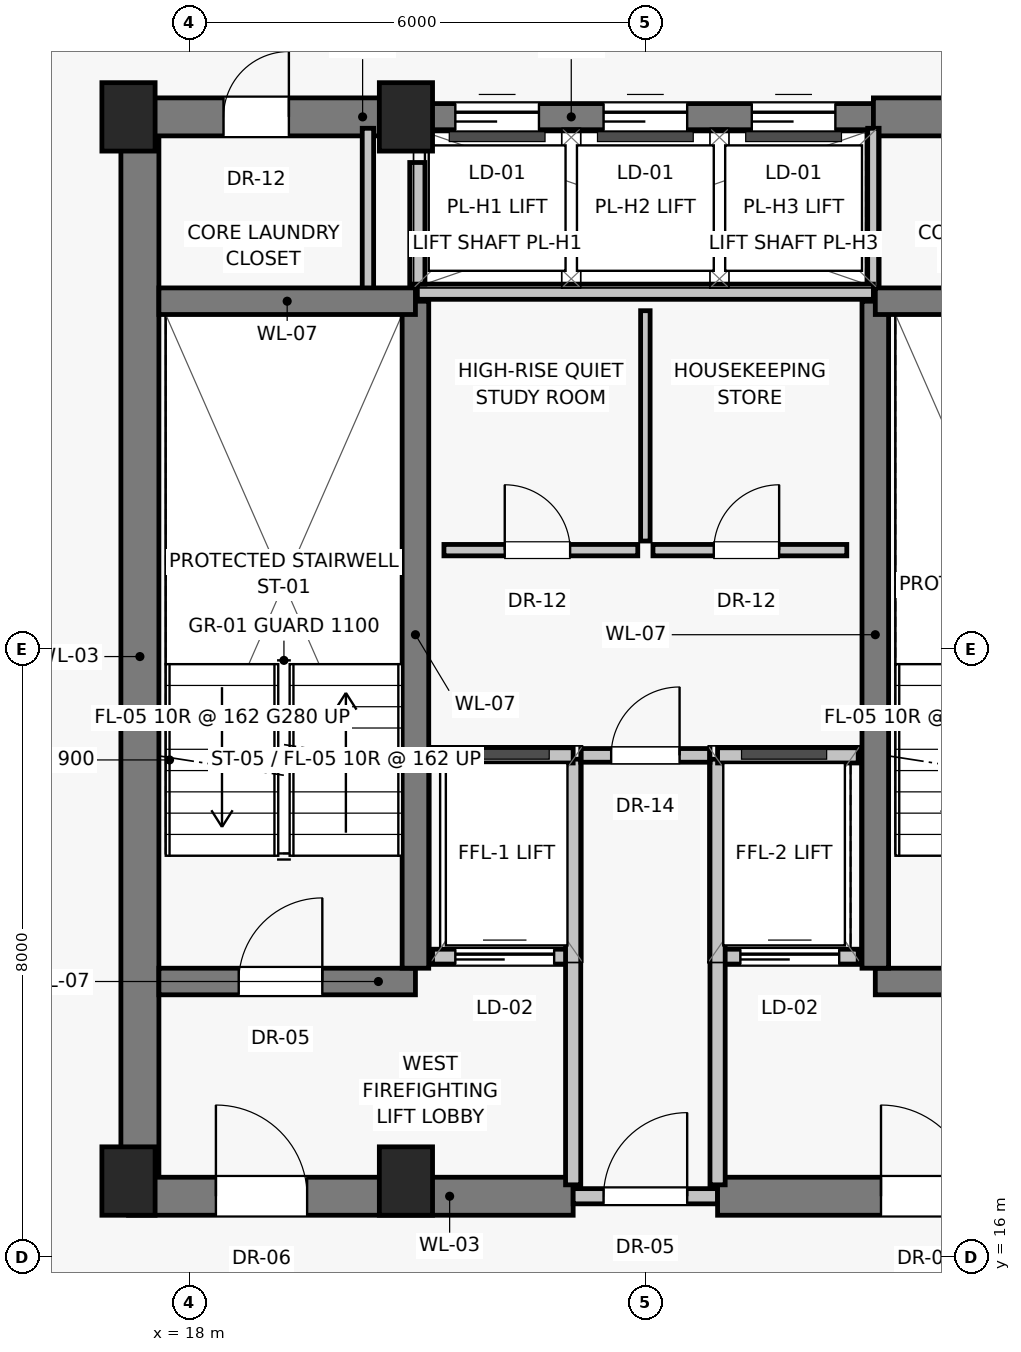
"""IFC4 building model, lengths in metres.
Left out: names, types, materials, properties, quantities, classifications, styles, units other than length and angle.
Written with IfcOpenShell. Run it as: python <this file> out.ifc"""

import sys

from ifc_helpers import new_model, si_unit, direction, frame, frame_2d, origin, origin_2d, place, context, subcontext, project, spatial, rectangle, extrude, source, transform, mapped, element, fill, save


model = new_model("IFC4")
c1 = context("Model", 3, precision=1e-05, world=origin(), true_north=direction((0.0, 1.0)))
c2 = subcontext(c1, "Body", "Model", "MODEL_VIEW")
j1 = project(units=[si_unit("LENGTHUNIT", "METRE"), si_unit("PLANEANGLEUNIT", "RADIAN")], contexts=[c1])
p1 = place(None, origin())
s1 = spatial("IfcSite", under=j1, at=p1, CompositionType="ELEMENT")
p2 = place(p1, origin())
s2 = spatial("IfcBuilding", under=s1, at=p2, CompositionType="ELEMENT")
p3 = place(p2, frame((0.0, 0.0, 188.6)))
s3 = spatial("IfcBuildingStorey", under=s2, at=p3, CompositionType="ELEMENT", Elevation=188.6)
for number, where, z_axis, x_axis in (
    (1, (17.2, 17.0, 0.0), (0.0, 0.0, 1.0), (1.0, 0.0, 0.0)),
    (2, (20.85, 17.0, 0.0), (0.0, 0.0, 1.0), (1.0, 0.0, 0.0)),
    (3, (17.2, 31.0, 0.0), (0.0, 0.0, 1.0), (1.0, 0.0, 0.0)),
    (4, (20.85, 31.0, 0.0), (0.0, 0.0, 1.0), (1.0, 0.0, 0.0)),
):
    element("IfcColumn", number, at=place(p3, frame(where, z_axis=z_axis, x_axis=x_axis)), inside=s3, PredefinedType="PILASTER", context=c2, shape_type="SweptSolid", body=[
        extrude(rectangle(XDim=0.7, YDim=0.9, at=origin_2d()), origin(), (0.0, 0.0, 1.0), 3.25),
    ])
p4 = place(p3, frame((17.35, 16.8, 0.0), z_axis=(0.0, 0.0, 1.0), x_axis=(0.0, 1.0, 0.0)))
e5 = element("IfcWall", 5, at=p4, inside=s3, PredefinedType="SHEAR", context=c2, shape_type="SweptSolid", body=[
    extrude(rectangle(XDim=14.2, YDim=0.5, at=frame_2d((7.1, 0.0))), origin(), (0.0, 0.0, 1.0), 3.015),
])
p5 = place(p3, frame((17.2, 16.8, 0.0), z_axis=(0.0, 0.0, 1.0), x_axis=(1.0, 0.0, 0.0)))
e6 = element("IfcWall", 6, at=p5, inside=s3, PredefinedType="SHEAR", context=c2, shape_type="SweptSolid", body=[
    extrude(rectangle(XDim=5.85, YDim=0.5, at=frame_2d((2.925, 0.0))), origin(), (0.0, 0.0, 1.0), 3.015),
])
p6 = place(p5, frame((1.15, 0.0, 0.0)))
e7 = element("IfcOpeningElement", 7, at=p6, cuts=e6, PredefinedType="OPENING", context=c2, shape_type="SweptSolid", body=[
    extrude(rectangle(XDim=1.2, YDim=2.03, at=frame_2d((0.6, 1.015))), frame((0.0, 0.26, 0.0), z_axis=(0.0, -1.0, 0.0), x_axis=(1.0, 0.0, 0.0)), (0.0, 0.0, 1.0), 0.52),
])
p7 = place(p3, frame((23.05, 16.8, 0.0), z_axis=(0.0, 0.0, 1.0), x_axis=(1.0, 0.0, 0.0)))
e8 = element("IfcWall", 8, at=p7, inside=s3, PredefinedType="SOLIDWALL", context=c2, shape_type="SweptSolid", body=[
    extrude(rectangle(XDim=1.9, YDim=0.2, at=frame_2d((0.95, 0.0))), origin(), (0.0, 0.0, 1.0), 2.165),
])
p8 = place(p7, frame((0.4, 0.0, 0.0)))
e9 = element("IfcOpeningElement", 9, at=p8, cuts=e8, PredefinedType="OPENING", context=c2, shape_type="SweptSolid", body=[
    extrude(rectangle(XDim=1.1, YDim=2.03, at=frame_2d((0.55, 1.015))), frame((0.0, 0.11, 0.0), z_axis=(0.0, -1.0, 0.0), x_axis=(1.0, 0.0, 0.0)), (0.0, 0.0, 1.0), 0.22),
])
p9 = place(p3, frame((24.95, 16.8, 0.0), z_axis=(0.0, 0.0, 1.0), x_axis=(1.0, 0.0, 0.0)))
e10 = element("IfcWall", 10, at=p9, inside=s3, PredefinedType="SHEAR", context=c2, shape_type="SweptSolid", body=[
    extrude(rectangle(XDim=5.85, YDim=0.5, at=frame_2d((2.925, 0.0))), origin(), (0.0, 0.0, 1.0), 3.015),
])
p10 = place(p9, frame((2.15, 0.0, 0.0)))
e11 = element("IfcOpeningElement", 11, at=p10, cuts=e10, PredefinedType="OPENING", context=c2, shape_type="SweptSolid", body=[
    extrude(rectangle(XDim=1.2, YDim=2.03, at=frame_2d((0.6, 1.015))), frame((0.0, 0.26, 0.0), z_axis=(0.0, -1.0, 0.0), x_axis=(1.0, 0.0, 0.0)), (0.0, 0.0, 1.0), 0.52),
])
p11 = place(p3, frame((17.2, 31.0, 0.0), z_axis=(0.0, 0.0, 1.0), x_axis=(1.0, 0.0, 0.0)))
e12 = element("IfcWall", 12, at=p11, inside=s3, PredefinedType="SHEAR", context=c2, shape_type="SweptSolid", body=[
    extrude(rectangle(XDim=3.8, YDim=0.5, at=frame_2d((1.9, 0.0))), origin(), (0.0, 0.0, 1.0), 3.015),
])
p12 = place(p11, frame((1.25, 0.0, 0.0)))
e13 = element("IfcOpeningElement", 13, at=p12, cuts=e12, PredefinedType="OPENING", context=c2, shape_type="SweptSolid", body=[
    extrude(rectangle(XDim=0.86, YDim=2.01, at=frame_2d((0.43, 1.005))), frame((0.0, 0.26, 0.0), z_axis=(0.0, -1.0, 0.0), x_axis=(1.0, 0.0, 0.0)), (0.0, 0.0, 1.0), 0.52),
])
p13 = place(p3, frame((21.0, 31.0, 0.0), z_axis=(0.0, 0.0, 1.0), x_axis=(1.0, 0.0, 0.0)))
e14 = element("IfcWall", 14, at=p13, inside=s3, PredefinedType="SHEAR", context=c2, shape_type="SweptSolid", body=[
    extrude(rectangle(XDim=6.0, YDim=0.35, at=frame_2d((3.0, 0.0))), origin(), (0.0, 0.0, 1.0), 3.015),
])
p14 = place(p13, frame((0.5, 0.0, 0.0)))
e15 = element("IfcOpeningElement", 15, at=p14, cuts=e14, PredefinedType="OPENING", context=c2, shape_type="SweptSolid", body=[
    extrude(rectangle(XDim=1.1, YDim=2.08, at=frame_2d((0.55, 1.04))), frame((0.0, 0.185, 0.0), z_axis=(0.0, -1.0, 0.0), x_axis=(1.0, 0.0, 0.0)), (0.0, 0.0, 1.0), 0.37),
])
p15 = place(p13, frame((2.45, 0.0, 0.0)))
e16 = element("IfcOpeningElement", 16, at=p15, cuts=e14, PredefinedType="OPENING", context=c2, shape_type="SweptSolid", body=[
    extrude(rectangle(XDim=1.1, YDim=2.08, at=frame_2d((0.55, 1.04))), frame((0.0, 0.185, 0.0), z_axis=(0.0, -1.0, 0.0), x_axis=(1.0, 0.0, 0.0)), (0.0, 0.0, 1.0), 0.37),
])
p16 = place(p13, frame((4.4, 0.0, 0.0)))
e17 = element("IfcOpeningElement", 17, at=p16, cuts=e14, PredefinedType="OPENING", context=c2, shape_type="SweptSolid", body=[
    extrude(rectangle(XDim=1.1, YDim=2.08, at=frame_2d((0.55, 1.04))), frame((0.0, 0.185, 0.0), z_axis=(0.0, -1.0, 0.0), x_axis=(1.0, 0.0, 0.0)), (0.0, 0.0, 1.0), 0.37),
])
p17 = place(p3, frame((27.0, 31.0, 0.0), z_axis=(0.0, 0.0, 1.0), x_axis=(1.0, 0.0, 0.0)))
e18 = element("IfcWall", 18, at=p17, inside=s3, PredefinedType="SHEAR", context=c2, shape_type="SweptSolid", body=[
    extrude(rectangle(XDim=3.8, YDim=0.5, at=frame_2d((1.9, 0.0))), origin(), (0.0, 0.0, 1.0), 3.015),
])
p18 = place(p17, frame((1.15, 0.0, 0.0)))
e19 = element("IfcOpeningElement", 19, at=p18, cuts=e18, PredefinedType="OPENING", context=c2, shape_type="SweptSolid", body=[
    extrude(rectangle(XDim=1.0, YDim=2.01, at=frame_2d((0.5, 1.005))), frame((0.0, 0.26, 0.0), z_axis=(0.0, -1.0, 0.0), x_axis=(1.0, 0.0, 0.0)), (0.0, 0.0, 1.0), 0.52),
])
for number, where, z_axis, x_axis in (
    (20, (20.35, 28.65, 0.0), (0.0, 0.0, 1.0), (0.0, 1.0, 0.0)),
    (21, (27.0, 28.65, 0.0), (0.0, 0.0, 1.0), (0.0, 1.0, 0.0)),
):
    element("IfcWall", number, at=place(p3, frame(where, z_axis=z_axis, x_axis=x_axis)), inside=s3, PredefinedType="PARTITIONING", context=c2, shape_type="SweptSolid", body=[
        extrude(rectangle(XDim=2.2, YDim=0.15, at=frame_2d((1.1, 0.0))), origin(), (0.0, 0.0, 1.0), 3.015),
    ])
p19 = place(p3, frame((17.6, 19.625, 0.0), z_axis=(0.0, 0.0, 1.0), x_axis=(1.0, 0.0, 0.0)))
e22 = element("IfcWall", 22, at=p19, inside=s3, PredefinedType="SHEAR", context=c2, shape_type="SweptSolid", body=[
    extrude(rectangle(XDim=3.375, YDim=0.35, at=frame_2d((1.688, 0.0))), origin(), (0.0, 0.0, 1.0), 3.015),
])
p20 = place(p19, frame((1.05, 0.0, 0.0)))
e23 = element("IfcOpeningElement", 23, at=p20, cuts=e22, PredefinedType="OPENING", context=c2, shape_type="SweptSolid", body=[
    extrude(rectangle(XDim=1.1, YDim=2.03, at=frame_2d((0.55, 1.015))), frame((0.0, 0.185, 0.0), z_axis=(0.0, -1.0, 0.0), x_axis=(1.0, 0.0, 0.0)), (0.0, 0.0, 1.0), 0.37),
])
p21 = place(p3, frame((21.2, 19.95, 0.0), z_axis=(0.0, 0.0, 1.0), x_axis=(1.0, 0.0, 0.0)))
e24 = element("IfcWall", 24, at=p21, inside=s3, PredefinedType="SOLIDWALL", context=c2, shape_type="SweptSolid", body=[
    extrude(rectangle(XDim=1.85, YDim=0.2, at=frame_2d((0.925, 0.0))), origin(), (0.0, 0.0, 1.0), 3.015),
])
p22 = place(p21, frame((0.3, 0.0, 0.0)))
e25 = element("IfcOpeningElement", 25, at=p22, cuts=e24, PredefinedType="OPENING", context=c2, shape_type="SweptSolid", body=[
    extrude(rectangle(XDim=1.3, YDim=2.25, at=frame_2d((0.65, 1.125))), frame((0.0, 0.11, 0.0), z_axis=(0.0, -1.0, 0.0), x_axis=(1.0, 0.0, 0.0)), (0.0, 0.0, 1.0), 0.22),
])
p23 = place(p3, frame((24.95, 19.95, 0.0), z_axis=(0.0, 0.0, 1.0), x_axis=(1.0, 0.0, 0.0)))
e26 = element("IfcWall", 26, at=p23, inside=s3, PredefinedType="SOLIDWALL", context=c2, shape_type="SweptSolid", body=[
    extrude(rectangle(XDim=1.85, YDim=0.2, at=frame_2d((0.925, 0.0))), origin(), (0.0, 0.0, 1.0), 3.015),
])
p24 = place(p23, frame((0.3, 0.0, 0.0)))
e27 = element("IfcOpeningElement", 27, at=p24, cuts=e26, PredefinedType="OPENING", context=c2, shape_type="SweptSolid", body=[
    extrude(rectangle(XDim=1.3, YDim=2.25, at=frame_2d((0.65, 1.125))), frame((0.0, 0.11, 0.0), z_axis=(0.0, -1.0, 0.0), x_axis=(1.0, 0.0, 0.0)), (0.0, 0.0, 1.0), 0.22),
])
p25 = place(p3, frame((27.025, 19.625, 0.0), z_axis=(0.0, 0.0, 1.0), x_axis=(1.0, 0.0, 0.0)))
e28 = element("IfcWall", 28, at=p25, inside=s3, PredefinedType="SHEAR", context=c2, shape_type="SweptSolid", body=[
    extrude(rectangle(XDim=3.375, YDim=0.35, at=frame_2d((1.688, 0.0))), origin(), (0.0, 0.0, 1.0), 3.015),
])
p26 = place(p25, frame((1.05, 0.0, 0.0)))
e29 = element("IfcOpeningElement", 29, at=p26, cuts=e28, PredefinedType="OPENING", context=c2, shape_type="SweptSolid", body=[
    extrude(rectangle(XDim=1.1, YDim=2.03, at=frame_2d((0.55, 1.015))), frame((0.0, 0.185, 0.0), z_axis=(0.0, -1.0, 0.0), x_axis=(1.0, 0.0, 0.0)), (0.0, 0.0, 1.0), 0.37),
])
for number, where, z_axis, x_axis in (
    (30, (20.975, 19.8, 0.0), (0.0, 0.0, 1.0), (0.0, 1.0, 0.0)),
    (31, (27.025, 19.8, 0.0), (0.0, 0.0, 1.0), (0.0, 1.0, 0.0)),
):
    element("IfcWall", number, at=place(p3, frame(where, z_axis=z_axis, x_axis=x_axis)), inside=s3, PredefinedType="SHEAR", context=c2, shape_type="SweptSolid", body=[
        extrude(rectangle(XDim=8.775, YDim=0.35, at=frame_2d((4.387, 0.0))), origin(), (0.0, 0.0, 1.0), 3.015),
    ])
for number, where, z_axis, x_axis in (
    (32, (17.6, 28.575, 0.0), (0.0, 0.0, 1.0), (1.0, 0.0, 0.0)),
    (33, (27.025, 28.575, 0.0), (0.0, 0.0, 1.0), (1.0, 0.0, 0.0)),
):
    element("IfcWall", number, at=place(p3, frame(where, z_axis=z_axis, x_axis=x_axis)), inside=s3, PredefinedType="SHEAR", context=c2, shape_type="SweptSolid", body=[
        extrude(rectangle(XDim=3.375, YDim=0.35, at=frame_2d((1.688, 0.0))), origin(), (0.0, 0.0, 1.0), 3.015),
    ])
for number, where, z_axis, x_axis in (
    (34, (23.05, 16.95, 0.0), (0.0, 0.0, 1.0), (0.0, 1.0, 0.0)),
    (35, (24.95, 16.95, 0.0), (0.0, 0.0, 1.0), (0.0, 1.0, 0.0)),
):
    element("IfcWall", number, at=place(p3, frame(where, z_axis=z_axis, x_axis=x_axis)), inside=s3, PredefinedType="SOLIDWALL", context=c2, shape_type="SweptSolid", body=[
        extrude(rectangle(XDim=5.6, YDim=0.2, at=frame_2d((2.8, 0.0))), origin(), (0.0, 0.0, 1.0), 3.015),
    ])
for number, where, z_axis, x_axis in (
    (36, (21.2, 22.6, 0.0), (0.0, 0.0, 1.0), (1.0, 0.0, 0.0)),
    (37, (24.95, 22.6, 0.0), (0.0, 0.0, 1.0), (1.0, 0.0, 0.0)),
):
    element("IfcWall", number, at=place(p3, frame(where, z_axis=z_axis, x_axis=x_axis)), inside=s3, PredefinedType="SOLIDWALL", context=c2, shape_type="SweptSolid", body=[
        extrude(rectangle(XDim=1.85, YDim=0.2, at=frame_2d((0.925, 0.0))), origin(), (0.0, 0.0, 1.0), 3.015),
    ])
p27 = place(p3, frame((21.0, 28.7, 0.0), z_axis=(0.0, 0.0, 1.0), x_axis=(1.0, 0.0, 0.0)))
e38 = element("IfcWall", 38, at=p27, inside=s3, PredefinedType="SOLIDWALL", context=c2, shape_type="SweptSolid", body=[
    extrude(rectangle(XDim=6.0, YDim=0.2, at=frame_2d((3.0, 0.0))), origin(), (0.0, 0.0, 1.0), 3.015),
])
p28 = place(p3, frame((21.0, 28.8, 0.0), z_axis=(0.0, 0.0, 1.0), x_axis=(0.0, 1.0, 0.0)))
e39 = element("IfcWall", 39, at=p28, inside=s3, PredefinedType="SOLIDWALL", context=c2, shape_type="SweptSolid", body=[
    extrude(rectangle(XDim=1.6, YDim=0.2, at=frame_2d((0.8, 0.0))), origin(), (0.0, 0.0, 1.0), 3.015),
])
p29 = place(p3, frame((23.15, 22.6, 0.0), z_axis=(0.0, 0.0, 1.0), x_axis=(1.0, 0.0, 0.0)))
e40 = element("IfcWall", 40, at=p29, inside=s3, PredefinedType="PARTITIONING", context=c2, shape_type="SweptSolid", body=[
    extrude(rectangle(XDim=1.7, YDim=0.18, at=frame_2d((0.85, 0.0))), origin(), (0.0, 0.0, 1.0), 3.015),
])
p30 = place(p29, frame((0.4, 0.0, 0.0)))
e41 = element("IfcOpeningElement", 41, at=p30, cuts=e40, PredefinedType="OPENING", context=c2, shape_type="SweptSolid", body=[
    extrude(rectangle(XDim=0.9, YDim=2.01, at=frame_2d((0.45, 1.005))), frame((0.0, 0.1, 0.0), z_axis=(0.0, -1.0, 0.0), x_axis=(1.0, 0.0, 0.0)), (0.0, 0.0, 1.0), 0.2),
])
p31 = place(p3, frame((21.35, 25.3, 0.0), z_axis=(0.0, 0.0, 1.0), x_axis=(1.0, 0.0, 0.0)))
e42 = element("IfcWall", 42, at=p31, inside=s3, PredefinedType="PARTITIONING", context=c2, shape_type="SweptSolid", body=[
    extrude(rectangle(XDim=2.55, YDim=0.15, at=frame_2d((1.275, 0.0))), origin(), (0.0, 0.0, 1.0), 3.015),
])
p32 = place(p31, frame((0.8, 0.0, 0.0)))
e43 = element("IfcOpeningElement", 43, at=p32, cuts=e42, PredefinedType="OPENING", context=c2, shape_type="SweptSolid", body=[
    extrude(rectangle(XDim=0.86, YDim=2.01, at=frame_2d((0.43, 1.005))), frame((0.0, 0.085, 0.0), z_axis=(0.0, -1.0, 0.0), x_axis=(1.0, 0.0, 0.0)), (0.0, 0.0, 1.0), 0.17),
])
p33 = place(p3, frame((24.1, 25.3, 0.0), z_axis=(0.0, 0.0, 1.0), x_axis=(1.0, 0.0, 0.0)))
e44 = element("IfcWall", 44, at=p33, inside=s3, PredefinedType="PARTITIONING", context=c2, shape_type="SweptSolid", body=[
    extrude(rectangle(XDim=2.55, YDim=0.15, at=frame_2d((1.275, 0.0))), origin(), (0.0, 0.0, 1.0), 3.015),
])
p34 = place(p33, frame((0.8, 0.0, 0.0)))
e45 = element("IfcOpeningElement", 45, at=p34, cuts=e44, PredefinedType="OPENING", context=c2, shape_type="SweptSolid", body=[
    extrude(rectangle(XDim=0.86, YDim=2.01, at=frame_2d((0.43, 1.005))), frame((0.0, 0.085, 0.0), z_axis=(0.0, -1.0, 0.0), x_axis=(1.0, 0.0, 0.0)), (0.0, 0.0, 1.0), 0.17),
])
p35 = place(p3, frame((24.0, 25.42, 0.0), z_axis=(0.0, 0.0, 1.0), x_axis=(0.0, 1.0, 0.0)))
e46 = element("IfcWall", 46, at=p35, inside=s3, PredefinedType="PARTITIONING", context=c2, shape_type="SweptSolid", body=[
    extrude(rectangle(XDim=3.03, YDim=0.125, at=frame_2d((1.515, 0.0))), origin(), (0.0, 0.0, 1.0), 3.015),
])
m1 = source(origin(), c2, "Body", "SweptSolid", [
    extrude(rectangle(XDim=1.2, YDim=2.03, at=frame_2d((0.6, 1.015))), frame((0.0, 0.025, 0.0), z_axis=(0.0, -1.0, 0.0), x_axis=(1.0, 0.0, 0.0)), (0.0, 0.0, 1.0), 0.05),
])
p36 = place(p6, origin())
e47 = element("IfcDoor", 47, at=p36, inside=s3, OperationType="SINGLE_SWING_LEFT", PredefinedType="DOOR", context=c2, shape_type="MappedRepresentation", body=[
    mapped(m1, transform((0.0, 0.0, 0.0), scale=1.0)),
])
fill(e7, e47)
m2 = source(origin(), c2, "Body", "SweptSolid", [
    extrude(rectangle(XDim=1.1, YDim=2.03, at=frame_2d((0.55, 1.015))), frame((0.0, 0.025, 0.0), z_axis=(0.0, -1.0, 0.0), x_axis=(1.0, 0.0, 0.0)), (0.0, 0.0, 1.0), 0.05),
])
p37 = place(p8, origin())
e48 = element("IfcDoor", 48, at=p37, inside=s3, OperationType="SINGLE_SWING_RIGHT", PredefinedType="DOOR", context=c2, shape_type="MappedRepresentation", body=[
    mapped(m2, transform((0.0, 0.0, 0.0), scale=1.0)),
])
fill(e9, e48)
p38 = place(p10, origin())
e49 = element("IfcDoor", 49, at=p38, inside=s3, OperationType="SINGLE_SWING_LEFT", PredefinedType="DOOR", context=c2, shape_type="MappedRepresentation", body=[
    mapped(m1, transform((0.0, 0.0, 0.0), scale=1.0)),
])
fill(e11, e49)
m3 = source(origin(), c2, "Body", "SweptSolid", [
    extrude(rectangle(XDim=0.86, YDim=2.01, at=frame_2d((0.43, 1.005))), frame((0.0, 0.025, 0.0), z_axis=(0.0, -1.0, 0.0), x_axis=(1.0, 0.0, 0.0)), (0.0, 0.0, 1.0), 0.05),
])
p39 = place(p12, origin())
e50 = element("IfcDoor", 50, at=p39, inside=s3, OperationType="SINGLE_SWING_RIGHT", PredefinedType="DOOR", context=c2, shape_type="MappedRepresentation", body=[
    mapped(m3, transform((0.0, 0.0, 0.0), scale=1.0)),
])
fill(e13, e50)
m4 = source(origin(), c2, "Body", "SweptSolid", [
    extrude(rectangle(XDim=1.1, YDim=2.08, at=frame_2d((0.55, 1.04))), frame((0.0, 0.025, 0.0), z_axis=(0.0, -1.0, 0.0), x_axis=(1.0, 0.0, 0.0)), (0.0, 0.0, 1.0), 0.05),
])
p40 = place(p14, origin())
e51 = element("IfcDoor", 51, at=p40, inside=s3, OperationType="SLIDING_TO_LEFT", PredefinedType="DOOR", context=c2, shape_type="MappedRepresentation", body=[
    mapped(m4, transform((0.0, 0.0, 0.0), scale=1.0)),
])
fill(e15, e51)
p41 = place(p15, origin())
e52 = element("IfcDoor", 52, at=p41, inside=s3, OperationType="SLIDING_TO_LEFT", PredefinedType="DOOR", context=c2, shape_type="MappedRepresentation", body=[
    mapped(m4, transform((0.0, 0.0, 0.0), scale=1.0)),
])
fill(e16, e52)
p42 = place(p16, origin())
e53 = element("IfcDoor", 53, at=p42, inside=s3, OperationType="SLIDING_TO_LEFT", PredefinedType="DOOR", context=c2, shape_type="MappedRepresentation", body=[
    mapped(m4, transform((0.0, 0.0, 0.0), scale=1.0)),
])
fill(e17, e53)
p43 = place(p20, origin())
e54 = element("IfcDoor", 54, at=p43, inside=s3, OperationType="SINGLE_SWING_RIGHT", PredefinedType="DOOR", context=c2, shape_type="MappedRepresentation", body=[
    mapped(m2, transform((0.0, 0.0, 0.0), scale=1.0)),
])
fill(e23, e54)
m5 = source(origin(), c2, "Body", "SweptSolid", [
    extrude(rectangle(XDim=1.3, YDim=2.25, at=frame_2d((0.65, 1.125))), frame((0.0, 0.025, 0.0), z_axis=(0.0, -1.0, 0.0), x_axis=(1.0, 0.0, 0.0)), (0.0, 0.0, 1.0), 0.05),
])
p44 = place(p22, origin())
e55 = element("IfcDoor", 55, at=p44, inside=s3, OperationType="SLIDING_TO_LEFT", PredefinedType="DOOR", context=c2, shape_type="MappedRepresentation", body=[
    mapped(m5, transform((0.0, 0.0, 0.0), scale=1.0)),
])
fill(e25, e55)
p45 = place(p24, origin())
e56 = element("IfcDoor", 56, at=p45, inside=s3, OperationType="SLIDING_TO_LEFT", PredefinedType="DOOR", context=c2, shape_type="MappedRepresentation", body=[
    mapped(m5, transform((0.0, 0.0, 0.0), scale=1.0)),
])
fill(e27, e56)
m6 = source(origin(), c2, "Body", "SweptSolid", [
    extrude(rectangle(XDim=0.9, YDim=2.01, at=frame_2d((0.45, 1.005))), frame((0.0, 0.025, 0.0), z_axis=(0.0, -1.0, 0.0), x_axis=(1.0, 0.0, 0.0)), (0.0, 0.0, 1.0), 0.05),
])
p46 = place(p30, origin())
e57 = element("IfcDoor", 57, at=p46, inside=s3, OperationType="SINGLE_SWING_RIGHT", PredefinedType="DOOR", context=c2, shape_type="MappedRepresentation", body=[
    mapped(m6, transform((0.0, 0.0, 0.0), scale=1.0)),
])
fill(e41, e57)
p47 = place(p32, origin())
e58 = element("IfcDoor", 58, at=p47, inside=s3, OperationType="SINGLE_SWING_LEFT", PredefinedType="DOOR", context=c2, shape_type="MappedRepresentation", body=[
    mapped(m3, transform((0.0, 0.0, 0.0), scale=1.0)),
])
fill(e43, e58)
p48 = place(p34, origin())
e59 = element("IfcDoor", 59, at=p48, inside=s3, OperationType="SINGLE_SWING_RIGHT", PredefinedType="DOOR", context=c2, shape_type="MappedRepresentation", body=[
    mapped(m3, transform((0.0, 0.0, 0.0), scale=1.0)),
])
fill(e45, e59)
save(model, sys.argv[1])
